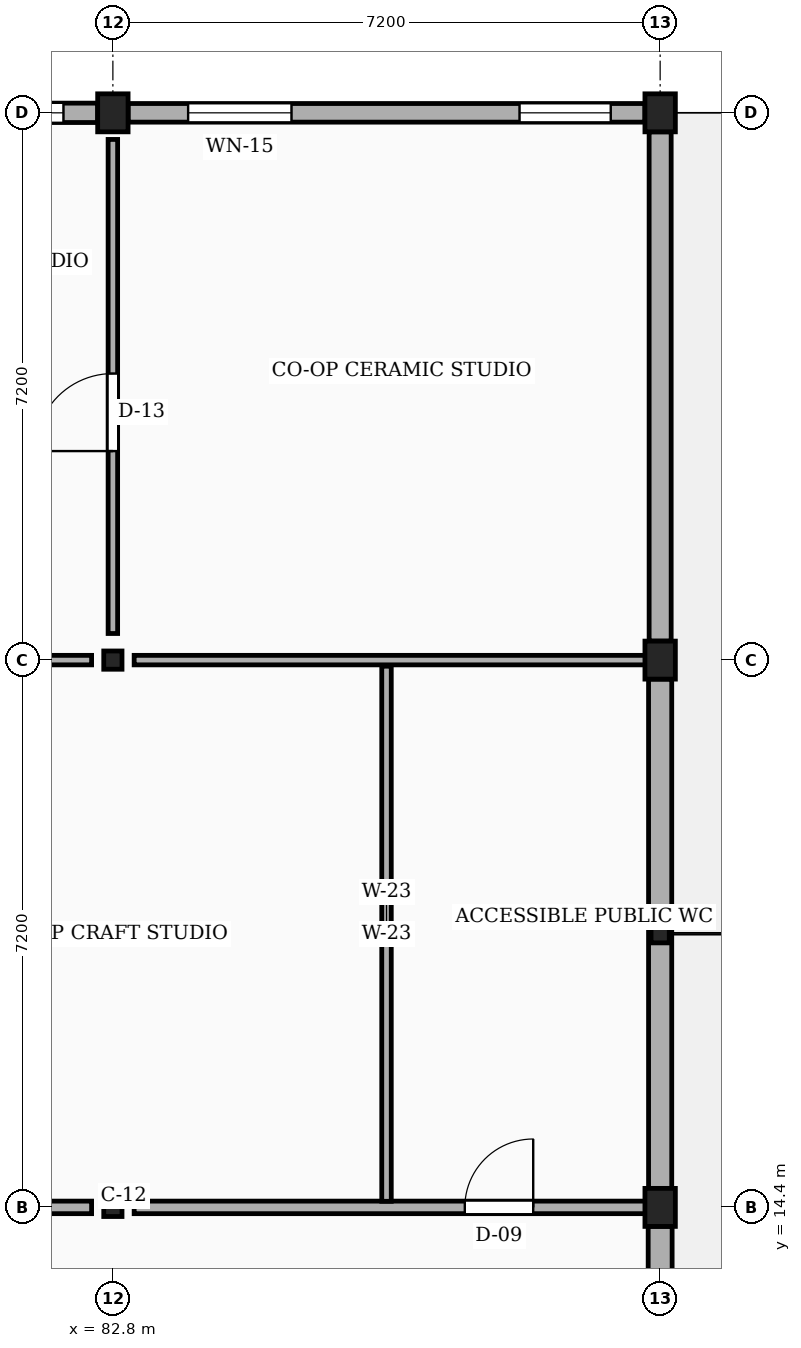
"""IFC4 building model, lengths in metres.
Left out: names, types, materials, properties, quantities, classifications, styles, units other than length and angle.
Written with IfcOpenShell. Run it as: python <this file> out.ifc"""

import sys

from ifc_helpers import new_model, si_unit, direction, frame, frame_2d, origin, origin_2d, place, context, subcontext, project, spatial, rectangle, i_section, extrude, element, fill, save


model = new_model("IFC4")
c1 = context("Model", 3, precision=1e-05, world=origin(), true_north=direction((0.0, 1.0)))
c2 = subcontext(c1, "Body", "Model", "MODEL_VIEW")
j1 = project(units=[si_unit("LENGTHUNIT", "METRE"), si_unit("PLANEANGLEUNIT", "RADIAN")], contexts=[c1])
p1 = place(None, origin())
s1 = spatial("IfcSite", under=j1, at=p1, CompositionType="ELEMENT")
p2 = place(p1, origin())
s2 = spatial("IfcBuilding", under=s1, at=p2, CompositionType="ELEMENT")
p3 = place(p2, frame((0.0, 0.0, 4.5)))
s3 = spatial("IfcBuildingStorey", under=s2, at=p3, CompositionType="ELEMENT", Elevation=4.5)
for number, where, z_axis, x_axis in (
    (1, (82.8, 14.4, 0.0), (0.0, 0.0, 1.0), (1.0, 0.0, 0.0)),
    (2, (82.8, 21.6, 0.0), (0.0, 0.0, 1.0), (1.0, 0.0, 0.0)),
):
    element("IfcColumn", number, at=place(p3, frame(where, z_axis=z_axis, x_axis=x_axis)), inside=s3, PredefinedType="COLUMN", context=c2, shape_type="SweptSolid", body=[
        extrude(i_section(OverallWidth=0.24, OverallDepth=0.24, WebThickness=0.01, FlangeThickness=0.017, FilletRadius=0.021, at=origin_2d()), origin(), (0.0, 0.0, 1.0), 3.15),
    ])
for number, where, z_axis, x_axis in (
    (3, (82.8, 28.8, 0.0), (0.0, 0.0, 1.0), (1.0, 0.0, 0.0)),
    (4, (90.0, 14.4, 0.0), (0.0, 0.0, 1.0), (1.0, 0.0, 0.0)),
    (5, (90.0, 21.6, 0.0), (0.0, 0.0, 1.0), (1.0, 0.0, 0.0)),
    (6, (90.0, 28.8, 0.0), (0.0, 0.0, 1.0), (1.0, 0.0, 0.0)),
):
    element("IfcColumn", number, at=place(p3, frame(where, z_axis=z_axis, x_axis=x_axis)), inside=s3, PredefinedType="COLUMN", context=c2, shape_type="SweptSolid", body=[
        extrude(rectangle(XDim=0.4, YDim=0.5, at=origin_2d()), origin(), (0.0, 0.0, 1.0), 3.15),
    ])
p4 = place(p3, frame((90.0, 18.0, 0.0), z_axis=(0.0, 0.0, 1.0), x_axis=(1.0, 0.0, 0.0)))
e7 = element("IfcColumn", 7, at=p4, inside=s3, PredefinedType="COLUMN", context=c2, shape_type="SweptSolid", body=[
    extrude(i_section(OverallWidth=0.24, OverallDepth=0.24, WebThickness=0.01, FlangeThickness=0.017, FilletRadius=0.021, at=origin_2d()), origin(), (0.0, 0.0, 1.0), 2.28),
])
p5 = place(p3, frame((90.0, 7.45, 0.0), z_axis=(0.0, 0.0, 1.0), x_axis=(0.0, 1.0, 0.0)))
e8 = element("IfcWall", 8, at=p5, inside=s3, PredefinedType="SOLIDWALL", context=c2, shape_type="SweptSolid", body=[
    extrude(rectangle(XDim=6.7, YDim=0.315, at=frame_2d((3.35, 0.0))), origin(), (0.0, 0.0, 1.0), 2.34),
])
p6 = place(p3, frame((90.0, 14.65, 0.0), z_axis=(0.0, 0.0, 1.0), x_axis=(0.0, 1.0, 0.0)))
e9 = element("IfcWall", 9, at=p6, inside=s3, PredefinedType="SOLIDWALL", context=c2, shape_type="SweptSolid", body=[
    extrude(rectangle(XDim=6.7, YDim=0.305, at=frame_2d((3.35, 0.0))), origin(), (0.0, 0.0, 1.0), 2.34),
])
p7 = place(p3, frame((90.0, 21.85, 0.0), z_axis=(0.0, 0.0, 1.0), x_axis=(0.0, 1.0, 0.0)))
e10 = element("IfcWall", 10, at=p7, inside=s3, PredefinedType="SOLIDWALL", context=c2, shape_type="SweptSolid", body=[
    extrude(rectangle(XDim=6.7, YDim=0.29, at=frame_2d((3.35, 0.0))), origin(), (0.0, 0.0, 1.0), 2.34),
])
p8 = place(p3, frame((89.8, 28.8, 0.0), z_axis=(0.0, 0.0, 1.0), x_axis=(-1.0, 0.0, 0.0)))
e11 = element("IfcWall", 11, at=p8, inside=s3, PredefinedType="SOLIDWALL", context=c2, shape_type="SweptSolid", body=[
    extrude(rectangle(XDim=6.8, YDim=0.245, at=frame_2d((3.4, 0.0))), origin(), (0.0, 0.0, 1.0), 2.34),
])
p9 = place(p8, frame((0.45, 0.0, 0.78)))
e12 = element("IfcOpeningElement", 12, at=p9, cuts=e11, PredefinedType="OPENING", context=c2, shape_type="SweptSolid", body=[
    extrude(rectangle(XDim=1.2, YDim=1.26, at=frame_2d((0.6, 0.63))), frame((0.0, 0.133, 0.0), z_axis=(0.0, -1.0, 0.0), x_axis=(1.0, 0.0, 0.0)), (0.0, 0.0, 1.0), 0.265),
])
p10 = place(p8, frame((4.65, 0.0, 0.78)))
e13 = element("IfcOpeningElement", 13, at=p10, cuts=e11, PredefinedType="OPENING", context=c2, shape_type="SweptSolid", body=[
    extrude(rectangle(XDim=1.36, YDim=1.26, at=frame_2d((0.68, 0.63))), frame((0.0, 0.133, 0.0), z_axis=(0.0, -1.0, 0.0), x_axis=(1.0, 0.0, 0.0)), (0.0, 0.0, 1.0), 0.265),
])
p11 = place(p3, frame((82.6, 28.8, 0.0), z_axis=(0.0, 0.0, 1.0), x_axis=(-1.0, 0.0, 0.0)))
e14 = element("IfcWall", 14, at=p11, inside=s3, PredefinedType="SOLIDWALL", context=c2, shape_type="SweptSolid", body=[
    extrude(rectangle(XDim=6.8, YDim=0.255, at=frame_2d((3.4, 0.0))), origin(), (0.0, 0.0, 1.0), 2.34),
])
p12 = place(p11, frame((0.45, 0.0, 0.78)))
e15 = element("IfcOpeningElement", 15, at=p12, cuts=e14, PredefinedType="OPENING", context=c2, shape_type="SweptSolid", body=[
    extrude(rectangle(XDim=1.36, YDim=1.26, at=frame_2d((0.68, 0.63))), frame((0.0, 0.137, 0.0), z_axis=(0.0, -1.0, 0.0), x_axis=(1.0, 0.0, 0.0)), (0.0, 0.0, 1.0), 0.275),
])
p13 = place(p11, frame((4.65, 0.0, 0.78)))
e16 = element("IfcOpeningElement", 16, at=p13, cuts=e14, PredefinedType="OPENING", context=c2, shape_type="SweptSolid", body=[
    extrude(rectangle(XDim=0.9, YDim=1.36, at=frame_2d((0.45, 0.68))), frame((0.0, 0.137, 0.0), z_axis=(0.0, -1.0, 0.0), x_axis=(1.0, 0.0, 0.0)), (0.0, 0.0, 1.0), 0.275),
])
p14 = place(p3, frame((79.22, 14.4, 0.0), z_axis=(0.0, 0.0, 1.0), x_axis=(1.0, 0.0, 0.0)))
e17 = element("IfcWall", 17, at=p14, inside=s3, PredefinedType="PARTITIONING", context=c2, shape_type="SweptSolid", body=[
    extrude(rectangle(XDim=3.3, YDim=0.165, at=frame_2d((1.65, 0.0))), origin(), (0.0, 0.0, 1.0), 2.29),
])
p15 = place(p14, frame((1.1, 0.0, 0.0)))
e18 = element("IfcOpeningElement", 18, at=p15, cuts=e17, PredefinedType="OPENING", context=c2, shape_type="SweptSolid", body=[
    extrude(rectangle(XDim=1.02, YDim=2.15, at=frame_2d((0.51, 1.075))), frame((0.0, 0.093, 0.0), z_axis=(0.0, -1.0, 0.0), x_axis=(1.0, 0.0, 0.0)), (0.0, 0.0, 1.0), 0.185),
])
p16 = place(p3, frame((83.08, 14.4, 0.0), z_axis=(0.0, 0.0, 1.0), x_axis=(1.0, 0.0, 0.0)))
e19 = element("IfcWall", 19, at=p16, inside=s3, PredefinedType="PARTITIONING", context=c2, shape_type="SweptSolid", body=[
    extrude(rectangle(XDim=6.745, YDim=0.165, at=frame_2d((3.373, 0.0))), origin(), (0.0, 0.0, 1.0), 2.29),
])
p17 = place(p16, frame((4.35, 0.0, 0.0)))
e20 = element("IfcOpeningElement", 20, at=p17, cuts=e19, PredefinedType="OPENING", context=c2, shape_type="SweptSolid", body=[
    extrude(rectangle(XDim=0.9, YDim=2.05, at=frame_2d((0.45, 1.025))), frame((0.0, 0.093, 0.0), z_axis=(0.0, -1.0, 0.0), x_axis=(1.0, 0.0, 0.0)), (0.0, 0.0, 1.0), 0.185),
])
p18 = place(p3, frame((86.4, 14.48, 0.0), z_axis=(0.0, 0.0, 1.0), x_axis=(0.0, 1.0, 0.0)))
e21 = element("IfcWall", 21, at=p18, inside=s3, PredefinedType="PARTITIONING", context=c2, shape_type="SweptSolid", body=[
    extrude(rectangle(XDim=7.04, YDim=0.125, at=frame_2d((3.52, 0.0))), origin(), (0.0, 0.0, 1.0), 2.29),
])
p19 = place(p3, frame((79.22, 21.6, 0.0), z_axis=(0.0, 0.0, 1.0), x_axis=(1.0, 0.0, 0.0)))
e22 = element("IfcWall", 22, at=p19, inside=s3, PredefinedType="PARTITIONING", context=c2, shape_type="SweptSolid", body=[
    extrude(rectangle(XDim=3.3, YDim=0.125, at=frame_2d((1.65, 0.0))), origin(), (0.0, 0.0, 1.0), 2.29),
])
p20 = place(p19, frame((1.1, 0.0, 0.0)))
e23 = element("IfcOpeningElement", 23, at=p20, cuts=e22, PredefinedType="OPENING", context=c2, shape_type="SweptSolid", body=[
    extrude(rectangle(XDim=1.02, YDim=2.15, at=frame_2d((0.51, 1.075))), frame((0.0, 0.073, 0.0), z_axis=(0.0, -1.0, 0.0), x_axis=(1.0, 0.0, 0.0)), (0.0, 0.0, 1.0), 0.145),
])
p21 = place(p3, frame((83.08, 21.6, 0.0), z_axis=(0.0, 0.0, 1.0), x_axis=(1.0, 0.0, 0.0)))
e24 = element("IfcWall", 24, at=p21, inside=s3, PredefinedType="PARTITIONING", context=c2, shape_type="SweptSolid", body=[
    extrude(rectangle(XDim=6.745, YDim=0.125, at=frame_2d((3.373, 0.0))), origin(), (0.0, 0.0, 1.0), 2.29),
])
p22 = place(p3, frame((82.8, 21.95, 0.0), z_axis=(0.0, 0.0, 1.0), x_axis=(0.0, 1.0, 0.0)))
e25 = element("IfcWall", 25, at=p22, inside=s3, PredefinedType="PARTITIONING", context=c2, shape_type="SweptSolid", body=[
    extrude(rectangle(XDim=6.5, YDim=0.125, at=frame_2d((3.25, 0.0))), origin(), (0.0, 0.0, 1.0), 2.29),
])
p23 = place(p22, frame((2.4, 0.0, 0.0)))
e26 = element("IfcOpeningElement", 26, at=p23, cuts=e25, PredefinedType="OPENING", context=c2, shape_type="SweptSolid", body=[
    extrude(rectangle(XDim=1.02, YDim=2.15, at=frame_2d((0.51, 1.075))), frame((0.0, 0.073, 0.0), z_axis=(0.0, -1.0, 0.0), x_axis=(1.0, 0.0, 0.0)), (0.0, 0.0, 1.0), 0.145),
])
p24 = place(p9, origin())
e27 = element("IfcWindow", 27, at=p24, inside=s3, PartitioningType="SINGLE_PANEL", PredefinedType="WINDOW", context=c2, shape_type="SweptSolid", body=[
    extrude(rectangle(XDim=1.2, YDim=1.26, at=frame_2d((0.6, 0.63))), frame((0.0, 0.03, 0.0), z_axis=(0.0, -1.0, 0.0), x_axis=(1.0, 0.0, 0.0)), (0.0, 0.0, 1.0), 0.06),
])
fill(e12, e27)
p25 = place(p10, origin())
e28 = element("IfcWindow", 28, at=p25, inside=s3, PartitioningType="SINGLE_PANEL", PredefinedType="WINDOW", context=c2, shape_type="SweptSolid", body=[
    extrude(rectangle(XDim=1.36, YDim=1.26, at=frame_2d((0.68, 0.63))), frame((0.0, 0.03, 0.0), z_axis=(0.0, -1.0, 0.0), x_axis=(1.0, 0.0, 0.0)), (0.0, 0.0, 1.0), 0.06),
])
fill(e13, e28)
p26 = place(p12, origin())
e29 = element("IfcWindow", 29, at=p26, inside=s3, PartitioningType="SINGLE_PANEL", PredefinedType="WINDOW", context=c2, shape_type="SweptSolid", body=[
    extrude(rectangle(XDim=1.36, YDim=1.26, at=frame_2d((0.68, 0.63))), frame((0.0, 0.03, 0.0), z_axis=(0.0, -1.0, 0.0), x_axis=(1.0, 0.0, 0.0)), (0.0, 0.0, 1.0), 0.06),
])
fill(e15, e29)
p27 = place(p17, origin())
e30 = element("IfcDoor", 30, at=p27, inside=s3, OperationType="SINGLE_SWING_RIGHT", PredefinedType="DOOR", context=c2, shape_type="SweptSolid", body=[
    extrude(rectangle(XDim=0.9, YDim=2.05, at=frame_2d((0.45, 1.025))), frame((0.0, 0.025, 0.0), z_axis=(0.0, -1.0, 0.0), x_axis=(1.0, 0.0, 0.0)), (0.0, 0.0, 1.0), 0.05),
])
fill(e20, e30)
p28 = place(p23, origin())
e31 = element("IfcDoor", 31, at=p28, inside=s3, OperationType="SINGLE_SWING_LEFT", PredefinedType="DOOR", context=c2, shape_type="SweptSolid", body=[
    extrude(rectangle(XDim=1.02, YDim=2.15, at=frame_2d((0.51, 1.075))), frame((0.0, 0.025, 0.0), z_axis=(0.0, -1.0, 0.0), x_axis=(1.0, 0.0, 0.0)), (0.0, 0.0, 1.0), 0.05),
])
fill(e26, e31)
save(model, sys.argv[1])
